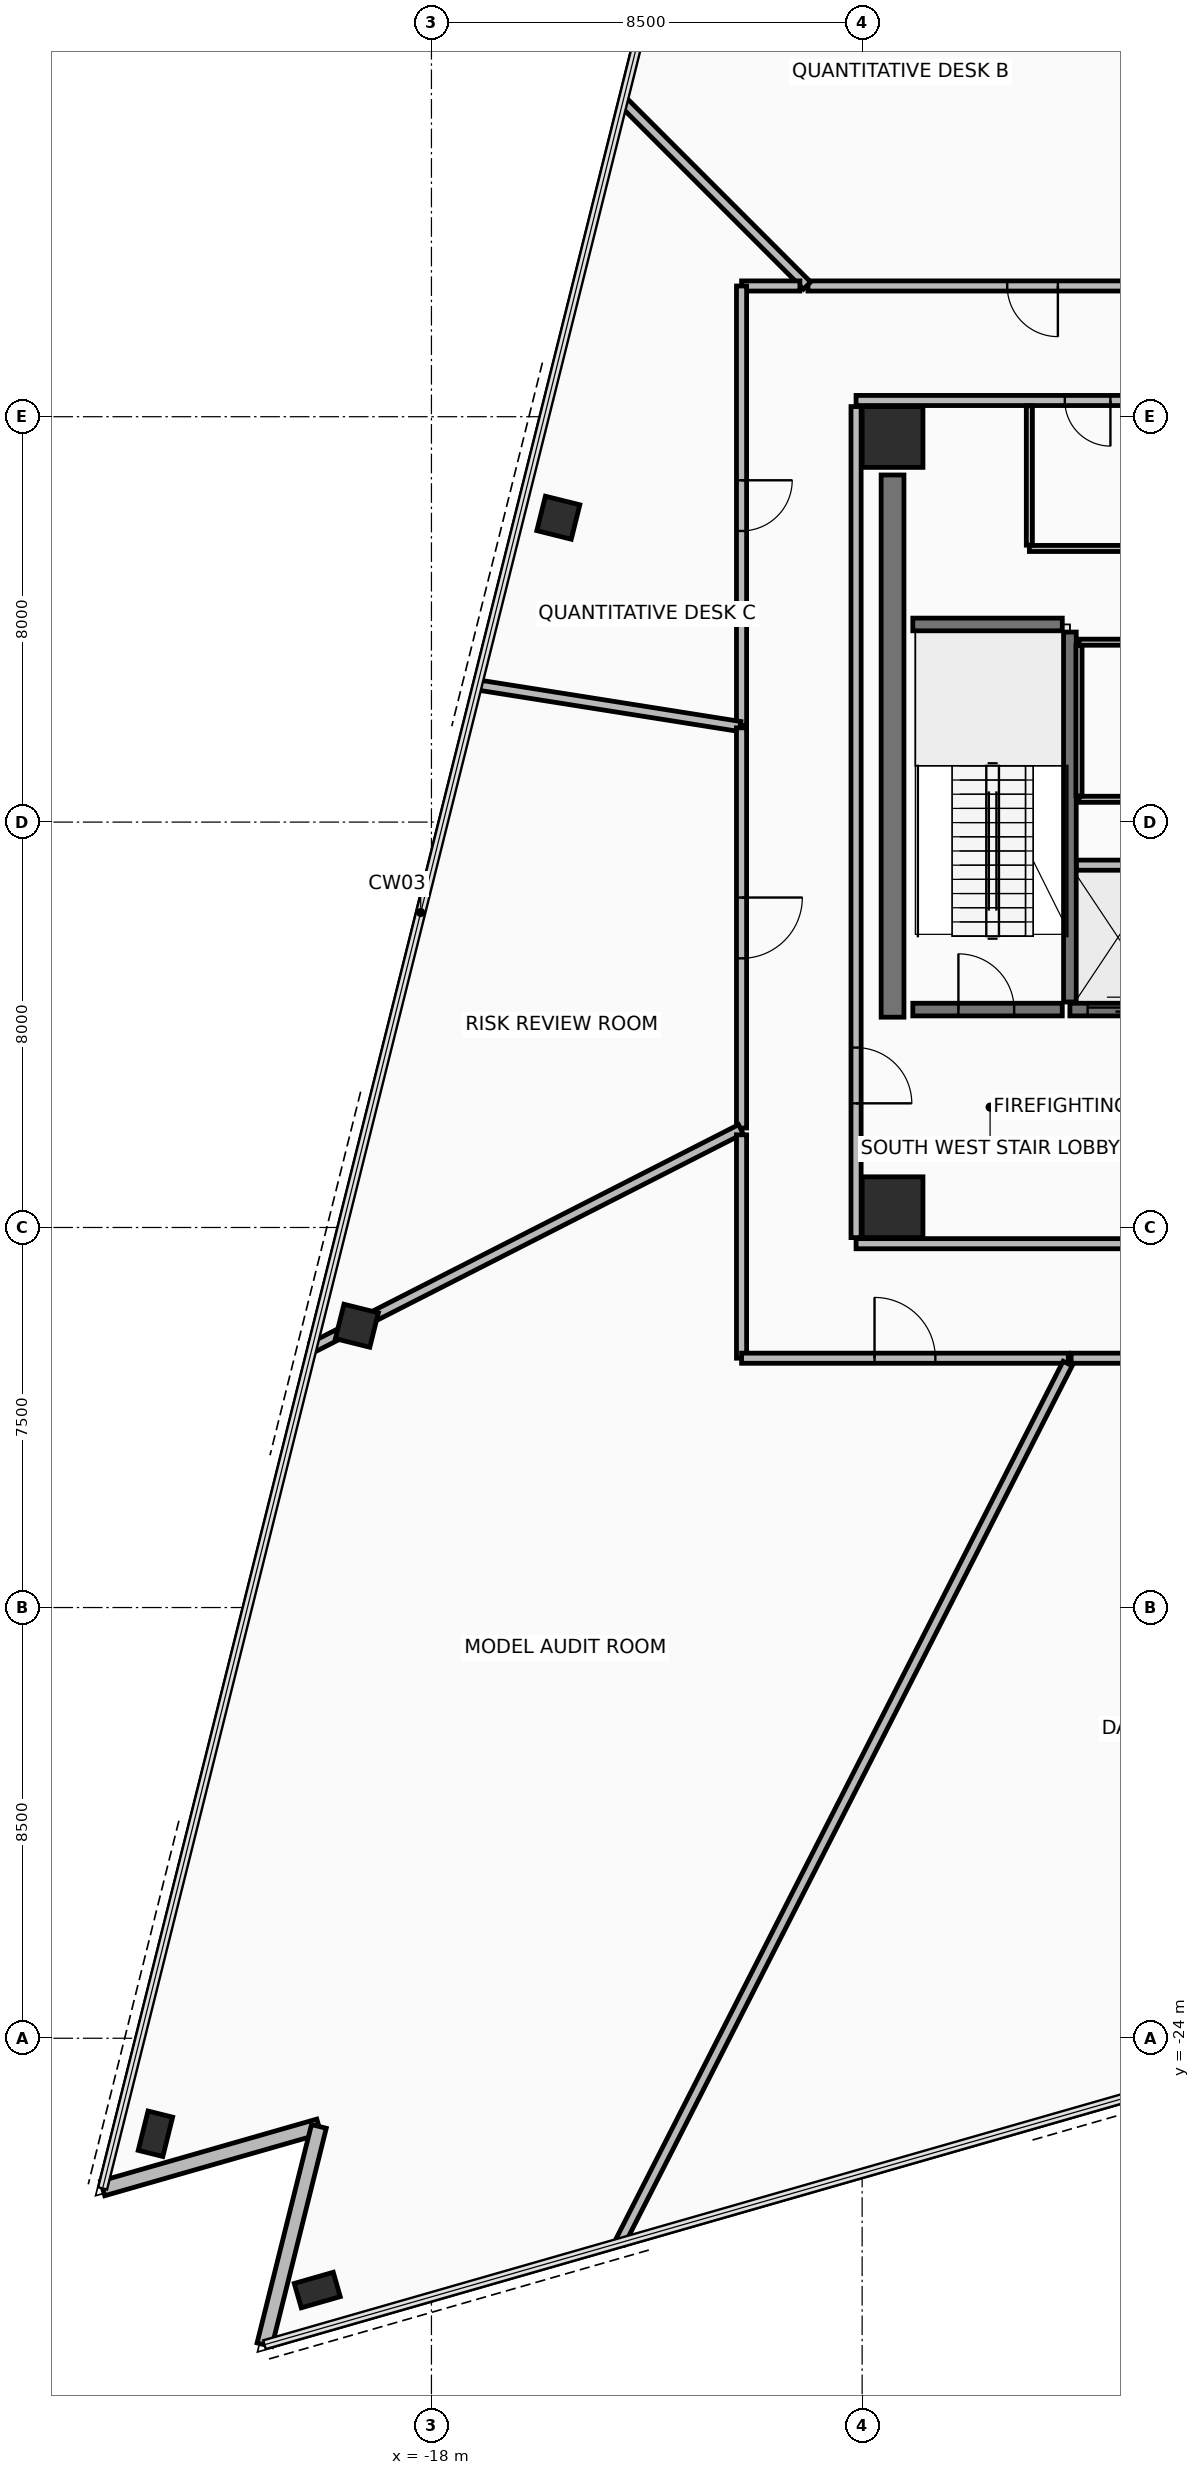
"""IFC4 building model, lengths in metres.
Left out: names, types, materials, properties, quantities, classifications, styles, units other than length and angle.
Written with IfcOpenShell. Run it as: python <this file> out.ifc"""

import sys

from ifc_helpers import new_model, si_unit, direction, frame, frame_2d, origin, origin_2d, place, context, subcontext, project, spatial, rectangle, hollow_rectangle, extrude, element, fill, save


model = new_model("IFC4")
c1 = context("Model", 3, precision=1e-05, world=origin(), true_north=direction((0.0, 1.0)))
c2 = subcontext(c1, "Body", "Model", "MODEL_VIEW")
j1 = project(units=[si_unit("LENGTHUNIT", "METRE"), si_unit("PLANEANGLEUNIT", "RADIAN")], contexts=[c1])
p1 = place(None, origin())
s1 = spatial("IfcSite", under=j1, at=p1, CompositionType="ELEMENT")
p2 = place(p1, origin())
s2 = spatial("IfcBuilding", under=s1, at=p2, CompositionType="ELEMENT")
p3 = place(p2, frame((0.0, 0.0, 107.7)))
s3 = spatial("IfcBuildingStorey", under=s2, at=p3, CompositionType="ELEMENT", Elevation=107.7)
for number, where, z_axis, x_axis in (
    (1, (-8.9, -7.6, 0.0), (0.0, 0.0, 1.0), (1.0, 0.0, 0.0)),
    (2, (-8.9, 7.6, 0.0), (0.0, 0.0, 1.0), (1.0, 0.0, 0.0)),
):
    element("IfcColumn", number, at=place(p3, frame(where, z_axis=z_axis, x_axis=x_axis)), inside=s3, PredefinedType="COLUMN", context=c2, shape_type="SweptSolid", body=[
        extrude(rectangle(XDim=1.2, YDim=1.2, at=origin_2d()), origin(), (0.0, 0.0, 1.0), 4.75),
    ])
for number, where, z_axis, x_axis in (
    (3, (-15.496, 6.007, 0.0), (0.0, 0.0, 1.0), (0.242, 0.97, 0.0)),
    (4, (-19.472, -9.939, 0.0), (0.0, 0.0, 1.0), (0.242, 0.97, 0.0)),
):
    element("IfcColumn", number, at=place(p3, frame(where, z_axis=z_axis, x_axis=x_axis)), inside=s3, PredefinedType="COLUMN", context=c2, shape_type="SweptSolid", body=[
        extrude(hollow_rectangle(XDim=0.7, YDim=0.7, WallThickness=0.04, at=origin_2d()), origin(), (0.0, 0.0, 1.0), 4.75),
    ])
for number, where, z_axis, x_axis in (
    (5, (-23.447, -25.885, 0.0), (0.0, 0.0, 1.0), (0.242, 0.97, 0.0)),
    (6, (-20.253, -28.969, 0.0), (0.0, 0.0, 1.0), (0.961, 0.276, 0.0)),
):
    element("IfcColumn", number, at=place(p3, frame(where, z_axis=z_axis, x_axis=x_axis)), inside=s3, PredefinedType="COLUMN", context=c2, shape_type="SweptSolid", body=[
        extrude(hollow_rectangle(XDim=0.5, YDim=0.8, WallThickness=0.04, at=origin_2d()), origin(), (0.0, 0.0, 1.0), 4.75),
    ])
p4 = place(p3, frame((-24.489, -26.964, 0.0), z_axis=(0.0, 0.0, 1.0), x_axis=(0.961259988927, 0.275643308803, 0.0)))
e7 = element("IfcWall", 7, at=p4, inside=s3, PredefinedType="STANDARD", context=c2, shape_type="SweptSolid", body=[
    extrude(rectangle(XDim=4.44, YDim=0.3, at=frame_2d((2.22, 0.0))), origin(), (0.0, 0.0, 1.0), 2.255),
])
p5 = place(p3, frame((-20.221, -25.74, 0.0), z_axis=(0.0, 0.0, 1.0), x_axis=(-0.241940431812, -0.970291104491, 0.0)))
e8 = element("IfcWall", 8, at=p5, inside=s3, PredefinedType="STANDARD", context=c2, shape_type="SweptSolid", body=[
    extrude(rectangle(XDim=4.44, YDim=0.3, at=frame_2d((2.22, 0.0))), origin(), (0.0, 0.0, 1.0), 2.255),
])
p6 = place(p3, frame((-8.9, -3.85, 0.0), z_axis=(0.0, 0.0, 1.0), x_axis=(0.0, 1.0, 0.0)))
e9 = element("IfcWall", 9, at=p6, inside=s3, PredefinedType="SHEAR", context=c2, shape_type="SweptSolid", body=[
    extrude(rectangle(XDim=10.7, YDim=0.45, at=frame_2d((5.35, 0.0))), origin(), (0.0, 0.0, 1.0), 4.56),
])
p7 = place(p3, frame((-9.62, -8.32, 0.0), z_axis=(0.0, 0.0, 1.0), x_axis=(1.0, 0.0, 0.0)))
e10 = element("IfcWall", 10, at=p7, inside=s3, PredefinedType="PARTITIONING", context=c2, shape_type="SweptSolid", body=[
    extrude(rectangle(XDim=19.24, YDim=0.2, at=frame_2d((9.62, 0.0))), origin(), (0.0, 0.0, 1.0), 2.355),
])
p8 = place(p7, frame((8.57, 0.0, 0.0)))
e11 = element("IfcOpeningElement", 11, at=p8, cuts=e10, PredefinedType="OPENING", context=c2, shape_type="SweptSolid", body=[
    extrude(rectangle(XDim=0.9, YDim=2.1, at=frame_2d((0.45, 1.05))), frame((0.0, 0.11, 0.0), z_axis=(0.0, -1.0, 0.0), x_axis=(1.0, 0.0, 0.0)), (0.0, 0.0, 1.0), 0.22),
])
p9 = place(p7, frame((15.02, 0.0, 0.0)))
e12 = element("IfcOpeningElement", 12, at=p9, cuts=e10, PredefinedType="OPENING", context=c2, shape_type="SweptSolid", body=[
    extrude(rectangle(XDim=0.9, YDim=2.1, at=frame_2d((0.45, 1.05))), frame((0.0, 0.11, 0.0), z_axis=(0.0, -1.0, 0.0), x_axis=(1.0, 0.0, 0.0)), (0.0, 0.0, 1.0), 0.22),
])
p10 = place(p3, frame((9.62, 8.32, 0.0), z_axis=(0.0, 0.0, 1.0), x_axis=(-1.0, 0.0, 0.0)))
e13 = element("IfcWall", 13, at=p10, inside=s3, PredefinedType="PARTITIONING", context=c2, shape_type="SweptSolid", body=[
    extrude(rectangle(XDim=19.24, YDim=0.2, at=frame_2d((9.62, 0.0))), origin(), (0.0, 0.0, 1.0), 2.355),
])
p11 = place(p10, frame((14.22, 0.0, 0.0)))
e14 = element("IfcOpeningElement", 14, at=p11, cuts=e13, PredefinedType="OPENING", context=c2, shape_type="SweptSolid", body=[
    extrude(rectangle(XDim=0.9, YDim=2.1, at=frame_2d((0.45, 1.05))), frame((0.0, 0.11, 0.0), z_axis=(0.0, -1.0, 0.0), x_axis=(1.0, 0.0, 0.0)), (0.0, 0.0, 1.0), 0.22),
])
p12 = place(p3, frame((-9.62, 8.2, 0.0), z_axis=(0.0, 0.0, 1.0), x_axis=(0.0, -1.0, 0.0)))
e15 = element("IfcWall", 15, at=p12, inside=s3, PredefinedType="PARTITIONING", context=c2, shape_type="SweptSolid", body=[
    extrude(rectangle(XDim=16.4, YDim=0.2, at=frame_2d((8.2, 0.0))), origin(), (0.0, 0.0, 1.0), 2.355),
])
p13 = place(p12, frame((12.65, 0.0, 0.0)))
e16 = element("IfcOpeningElement", 16, at=p13, cuts=e15, PredefinedType="OPENING", context=c2, shape_type="SweptSolid", body=[
    extrude(rectangle(XDim=1.1, YDim=2.15, at=frame_2d((0.55, 1.075))), frame((0.0, 0.11, 0.0), z_axis=(0.0, -1.0, 0.0), x_axis=(1.0, 0.0, 0.0)), (0.0, 0.0, 1.0), 0.22),
])
p14 = place(p3, frame((-5.4, -3.55, 0.0), z_axis=(0.0, 0.0, 1.0), x_axis=(0.0, 1.0, 0.0)))
e17 = element("IfcWall", 17, at=p14, inside=s3, PredefinedType="SHEAR", context=c2, shape_type="SweptSolid", body=[
    extrude(rectangle(XDim=7.3, YDim=0.25, at=frame_2d((3.65, 0.0))), origin(), (0.0, 0.0, 1.0), 4.56),
])
p15 = place(p3, frame((-8.5, -3.7, 0.0), z_axis=(0.0, 0.0, 1.0), x_axis=(1.0, 0.0, 0.0)))
e18 = element("IfcWall", 18, at=p15, inside=s3, PredefinedType="SHEAR", context=c2, shape_type="SweptSolid", body=[
    extrude(rectangle(XDim=2.95, YDim=0.25, at=frame_2d((1.475, 0.0))), origin(), (0.0, 0.0, 1.0), 4.56),
])
p16 = place(p15, frame((0.9, 0.0, 0.0)))
e19 = element("IfcOpeningElement", 19, at=p16, cuts=e18, PredefinedType="OPENING", context=c2, shape_type="SweptSolid", body=[
    extrude(rectangle(XDim=1.1, YDim=2.15, at=frame_2d((0.55, 1.075))), frame((0.0, 0.135, 0.0), z_axis=(0.0, -1.0, 0.0), x_axis=(1.0, 0.0, 0.0)), (0.0, 0.0, 1.0), 0.27),
])
p17 = place(p3, frame((-8.5, 3.9, 0.0), z_axis=(0.0, 0.0, 1.0), x_axis=(1.0, 0.0, 0.0)))
e20 = element("IfcWall", 20, at=p17, inside=s3, PredefinedType="SHEAR", context=c2, shape_type="SweptSolid", body=[
    extrude(rectangle(XDim=2.95, YDim=0.25, at=frame_2d((1.475, 0.0))), origin(), (0.0, 0.0, 1.0), 4.56),
])
p18 = place(p3, frame((-5.4, -3.7, 0.0), z_axis=(0.0, 0.0, 1.0), x_axis=(1.0, 0.0, 0.0)))
e21 = element("IfcWall", 21, at=p18, inside=s3, PredefinedType="SHEAR", context=c2, shape_type="SweptSolid", body=[
    extrude(rectangle(XDim=1.9, YDim=0.25, at=frame_2d((0.95, 0.0))), origin(), (0.0, 0.0, 1.0), 4.56),
])
p19 = place(p18, frame((0.35, 0.0, 0.0)))
e22 = element("IfcOpeningElement", 22, at=p19, cuts=e21, PredefinedType="OPENING", context=c2, shape_type="SweptSolid", body=[
    extrude(rectangle(XDim=1.2, YDim=2.2, at=frame_2d((0.6, 1.1))), frame((0.0, 0.135, 0.0), z_axis=(0.0, -1.0, 0.0), x_axis=(1.0, 0.0, 0.0)), (0.0, 0.0, 1.0), 0.27),
])
p20 = place(p3, frame((-5.27, -0.85, 0.0), z_axis=(0.0, 0.0, 1.0), x_axis=(1.0, 0.0, 0.0)))
e23 = element("IfcWall", 23, at=p20, inside=s3, PredefinedType="PARTITIONING", context=c2, shape_type="SweptSolid", body=[
    extrude(rectangle(XDim=1.77, YDim=0.2, at=frame_2d((0.885, 0.0))), origin(), (0.0, 0.0, 1.0), 4.56),
])
p21 = place(p3, frame((-5.22, 0.45, 0.0), z_axis=(0.0, 0.0, 1.0), x_axis=(1.0, 0.0, 0.0)))
e24 = element("IfcWall", 24, at=p21, inside=s3, PredefinedType="PARTITIONING", context=c2, shape_type="SweptSolid", body=[
    extrude(rectangle(XDim=3.17, YDim=0.12, at=frame_2d((1.585, 0.0))), origin(), (0.0, 0.0, 1.0), 4.56),
])
p22 = place(p3, frame((-2.115, 3.55, 0.0), z_axis=(0.0, 0.0, 1.0), x_axis=(-1.0, 0.0, 0.0)))
e25 = element("IfcWall", 25, at=p22, inside=s3, PredefinedType="PARTITIONING", context=c2, shape_type="SweptSolid", body=[
    extrude(rectangle(XDim=3.105, YDim=0.12, at=frame_2d((1.552, 0.0))), origin(), (0.0, 0.0, 1.0), 4.56),
])
p23 = place(p3, frame((-5.22, 3.485, 0.0), z_axis=(0.0, 0.0, 1.0), x_axis=(0.0, -1.0, 0.0)))
e26 = element("IfcWall", 26, at=p23, inside=s3, PredefinedType="PARTITIONING", context=c2, shape_type="SweptSolid", body=[
    extrude(rectangle(XDim=2.97, YDim=0.12, at=frame_2d((1.485, 0.0))), origin(), (0.0, 0.0, 1.0), 4.56),
])
p24 = place(p3, frame((-6.2, 5.4, 0.0), z_axis=(0.0, 0.0, 1.0), x_axis=(1.0, 0.0, 0.0)))
e27 = element("IfcWall", 27, at=p24, inside=s3, PredefinedType="PARTITIONING", context=c2, shape_type="SweptSolid", body=[
    extrude(rectangle(XDim=2.3, YDim=0.12, at=frame_2d((1.15, 0.0))), origin(), (0.0, 0.0, 1.0), 4.56),
])
p25 = place(p3, frame((-6.2, 8.215, 0.0), z_axis=(0.0, 0.0, 1.0), x_axis=(0.0, -1.0, 0.0)))
e28 = element("IfcWall", 28, at=p25, inside=s3, PredefinedType="PARTITIONING", context=c2, shape_type="SweptSolid", body=[
    extrude(rectangle(XDim=2.75, YDim=0.12, at=frame_2d((1.375, 0.0))), origin(), (0.0, 0.0, 1.0), 3.755),
])
p26 = place(p3, frame((-1.705, 10.58, 0.0), z_axis=(0.0, 0.0, 1.0), x_axis=(-1.0, 0.0, 0.0)))
e29 = element("IfcWall", 29, at=p26, inside=s3, PredefinedType="PARTITIONING", context=c2, shape_type="SweptSolid", body=[
    extrude(rectangle(XDim=8.865, YDim=0.2, at=frame_2d((4.432, 0.0))), origin(), (0.0, 0.0, 1.0), 2.355),
])
p27 = place(p26, frame((3.932, 0.0, 0.0)))
e30 = element("IfcOpeningElement", 30, at=p27, cuts=e29, PredefinedType="OPENING", context=c2, shape_type="SweptSolid", body=[
    extrude(rectangle(XDim=1.0, YDim=2.15, at=frame_2d((0.5, 1.075))), frame((0.0, 0.11, 0.0), z_axis=(0.0, -1.0, 0.0), x_axis=(1.0, 0.0, 0.0)), (0.0, 0.0, 1.0), 0.22),
])
p28 = place(p3, frame((-10.587, 10.587, 0.0), z_axis=(0.0, 0.0, 1.0), x_axis=(-0.707106781187, 0.707106781187, 0.0)))
e31 = element("IfcWall", 31, at=p28, inside=s3, PredefinedType="PARTITIONING", context=c2, shape_type="SweptSolid", body=[
    extrude(rectangle(XDim=5.125, YDim=0.2, at=frame_2d((2.562, 0.0))), origin(), (0.0, 0.0, 1.0), 2.255),
])
p29 = place(p3, frame((-10.729, 10.58, 0.0), z_axis=(0.0, 0.0, 1.0), x_axis=(-1.0, 0.0, 0.0)))
e32 = element("IfcWall", 32, at=p29, inside=s3, PredefinedType="PARTITIONING", context=c2, shape_type="SweptSolid", body=[
    extrude(rectangle(XDim=1.151, YDim=0.2, at=frame_2d((0.575, 0.0))), origin(), (0.0, 0.0, 1.0), 4.195),
])
p30 = place(p3, frame((-11.88, 10.579, 0.0), z_axis=(0.0, 0.0, 1.0), x_axis=(0.0, -1.0, 0.0)))
e33 = element("IfcWall", 33, at=p30, inside=s3, PredefinedType="PARTITIONING", context=c2, shape_type="SweptSolid", body=[
    extrude(rectangle(XDim=8.668, YDim=0.2, at=frame_2d((4.334, 0.0))), origin(), (0.0, 0.0, 1.0), 2.755),
])
p31 = place(p30, frame((3.834, 0.0, 0.0)))
e34 = element("IfcOpeningElement", 34, at=p31, cuts=e33, PredefinedType="OPENING", context=c2, shape_type="SweptSolid", body=[
    extrude(rectangle(XDim=1.0, YDim=2.15, at=frame_2d((0.5, 1.075))), frame((0.0, 0.11, 0.0), z_axis=(0.0, -1.0, 0.0), x_axis=(1.0, 0.0, 0.0)), (0.0, 0.0, 1.0), 0.22),
])
p32 = place(p3, frame((-11.909, 1.886, 0.0), z_axis=(0.0, 0.0, 1.0), x_axis=(-0.987686625079, 0.156445295998, 0.0)))
e35 = element("IfcWall", 35, at=p32, inside=s3, PredefinedType="PARTITIONING", context=c2, shape_type="SweptSolid", body=[
    extrude(rectangle(XDim=5.22, YDim=0.2, at=frame_2d((2.61, 0.0))), origin(), (0.0, 0.0, 1.0), 2.255),
])
p33 = place(p3, frame((-11.88, 1.86, 0.0), z_axis=(0.0, 0.0, 1.0), x_axis=(0.0, -1.0, 0.0)))
e36 = element("IfcWall", 36, at=p33, inside=s3, PredefinedType="PARTITIONING", context=c2, shape_type="SweptSolid", body=[
    extrude(rectangle(XDim=7.898, YDim=0.2, at=frame_2d((3.949, 0.0))), origin(), (0.0, 0.0, 1.0), 4.56),
])
p34 = place(p33, frame((3.349, 0.0, 0.0)))
e37 = element("IfcOpeningElement", 37, at=p34, cuts=e36, PredefinedType="OPENING", context=c2, shape_type="SweptSolid", body=[
    extrude(rectangle(XDim=1.2, YDim=2.15, at=frame_2d((0.6, 1.075))), frame((0.0, 0.11, 0.0), z_axis=(0.0, -1.0, 0.0), x_axis=(1.0, 0.0, 0.0)), (0.0, 0.0, 1.0), 0.22),
])
p35 = place(p3, frame((-11.894, -6.06, 0.0), z_axis=(0.0, 0.0, 1.0), x_axis=(-0.891001418235, -0.454000520598, 0.0)))
e38 = element("IfcWall", 38, at=p35, inside=s3, PredefinedType="PARTITIONING", context=c2, shape_type="SweptSolid", body=[
    extrude(rectangle(XDim=9.493, YDim=0.2, at=frame_2d((4.747, 0.0))), origin(), (0.0, 0.0, 1.0), 2.255),
])
p36 = place(p3, frame((-11.88, -6.171, 0.0), z_axis=(0.0, 0.0, 1.0), x_axis=(0.0, -1.0, 0.0)))
e39 = element("IfcWall", 39, at=p36, inside=s3, PredefinedType="PARTITIONING", context=c2, shape_type="SweptSolid", body=[
    extrude(rectangle(XDim=4.408, YDim=0.2, at=frame_2d((2.204, 0.0))), origin(), (0.0, 0.0, 1.0), 2.755),
])
p37 = place(p3, frame((-11.879, -10.58, 0.0), z_axis=(0.0, 0.0, 1.0), x_axis=(1.0, 0.0, 0.0)))
e40 = element("IfcWall", 40, at=p37, inside=s3, PredefinedType="PARTITIONING", context=c2, shape_type="SweptSolid", body=[
    extrude(rectangle(XDim=6.448, YDim=0.2, at=frame_2d((3.224, 0.0))), origin(), (0.0, 0.0, 1.0), 2.355),
])
p38 = place(p37, frame((2.624, 0.0, 0.0)))
e41 = element("IfcOpeningElement", 41, at=p38, cuts=e40, PredefinedType="OPENING", context=c2, shape_type="SweptSolid", body=[
    extrude(rectangle(XDim=1.2, YDim=2.15, at=frame_2d((0.6, 1.075))), frame((0.0, 0.11, 0.0), z_axis=(0.0, -1.0, 0.0), x_axis=(1.0, 0.0, 0.0)), (0.0, 0.0, 1.0), 0.22),
])
p39 = place(p3, frame((-5.444, -10.685, 0.0), z_axis=(0.0, 0.0, 1.0), x_axis=(-0.453983839292, -0.891009917824, 0.0)))
e42 = element("IfcWall", 42, at=p39, inside=s3, PredefinedType="PARTITIONING", context=c2, shape_type="SweptSolid", body=[
    extrude(rectangle(XDim=19.465, YDim=0.2, at=frame_2d((9.732, 0.0))), origin(), (0.0, 0.0, 1.0), 2.255),
])
p40 = place(p3, frame((-5.375, -10.58, 0.0), z_axis=(0.0, 0.0, 1.0), x_axis=(1.0, 0.0, 0.0)))
e43 = element("IfcWall", 43, at=p40, inside=s3, PredefinedType="PARTITIONING", context=c2, shape_type="SweptSolid", body=[
    extrude(rectangle(XDim=7.03, YDim=0.2, at=frame_2d((3.515, 0.0))), origin(), (0.0, 0.0, 1.0), 2.355),
])
p41 = place(p40, frame((3.065, 0.0, 0.0)))
e44 = element("IfcOpeningElement", 44, at=p41, cuts=e43, PredefinedType="OPENING", context=c2, shape_type="SweptSolid", body=[
    extrude(rectangle(XDim=0.9, YDim=2.1, at=frame_2d((0.45, 1.05))), frame((0.0, 0.11, 0.0), z_axis=(0.0, -1.0, 0.0), x_axis=(1.0, 0.0, 0.0)), (0.0, 0.0, 1.0), 0.22),
])
p42 = place(p13, frame((1.1, 0.0, 0.0), z_axis=(0.0, 0.0, 1.0), x_axis=(-1.0, 0.0, 0.0)))
e45 = element("IfcDoor", 45, at=p42, inside=s3, OperationType="SINGLE_SWING_LEFT", PredefinedType="DOOR", context=c2, shape_type="SweptSolid", body=[
    extrude(rectangle(XDim=1.1, YDim=2.15, at=frame_2d((0.55, 1.075))), frame((0.0, 0.025, 0.0), z_axis=(0.0, -1.0, 0.0), x_axis=(1.0, 0.0, 0.0)), (0.0, 0.0, 1.0), 0.05),
])
fill(e16, e45)
p43 = place(p16, origin())
e46 = element("IfcDoor", 46, at=p43, inside=s3, OperationType="SINGLE_SWING_LEFT", PredefinedType="DOOR", context=c2, shape_type="SweptSolid", body=[
    extrude(rectangle(XDim=1.1, YDim=2.15, at=frame_2d((0.55, 1.075))), frame((0.0, 0.025, 0.0), z_axis=(0.0, -1.0, 0.0), x_axis=(1.0, 0.0, 0.0)), (0.0, 0.0, 1.0), 0.05),
])
fill(e19, e46)
p44 = place(p19, origin())
e47 = element("IfcDoor", 47, at=p44, inside=s3, OperationType="SLIDING_TO_RIGHT", PredefinedType="DOOR", context=c2, shape_type="SweptSolid", body=[
    extrude(rectangle(XDim=1.2, YDim=2.2, at=frame_2d((0.6, 1.1))), frame((0.0, 0.025, 0.0), z_axis=(0.0, -1.0, 0.0), x_axis=(1.0, 0.0, 0.0)), (0.0, 0.0, 1.0), 0.05),
])
fill(e22, e47)
p45 = place(p11, origin())
e48 = element("IfcDoor", 48, at=p45, inside=s3, OperationType="SINGLE_SWING_LEFT", PredefinedType="DOOR", context=c2, shape_type="SweptSolid", body=[
    extrude(rectangle(XDim=0.9, YDim=2.1, at=frame_2d((0.45, 1.05))), frame((0.0, 0.025, 0.0), z_axis=(0.0, -1.0, 0.0), x_axis=(1.0, 0.0, 0.0)), (0.0, 0.0, 1.0), 0.05),
])
fill(e14, e48)
p46 = place(p27, origin())
e49 = element("IfcDoor", 49, at=p46, inside=s3, OperationType="SINGLE_SWING_RIGHT", PredefinedType="DOOR", context=c2, shape_type="SweptSolid", body=[
    extrude(rectangle(XDim=1.0, YDim=2.15, at=frame_2d((0.5, 1.075))), frame((0.0, 0.025, 0.0), z_axis=(0.0, -1.0, 0.0), x_axis=(1.0, 0.0, 0.0)), (0.0, 0.0, 1.0), 0.05),
])
fill(e30, e49)
p47 = place(p31, origin())
e50 = element("IfcDoor", 50, at=p47, inside=s3, OperationType="SINGLE_SWING_RIGHT", PredefinedType="DOOR", context=c2, shape_type="SweptSolid", body=[
    extrude(rectangle(XDim=1.0, YDim=2.15, at=frame_2d((0.5, 1.075))), frame((0.0, 0.025, 0.0), z_axis=(0.0, -1.0, 0.0), x_axis=(1.0, 0.0, 0.0)), (0.0, 0.0, 1.0), 0.05),
])
fill(e34, e50)
p48 = place(p34, origin())
e51 = element("IfcDoor", 51, at=p48, inside=s3, OperationType="SINGLE_SWING_LEFT", PredefinedType="DOOR", context=c2, shape_type="SweptSolid", body=[
    extrude(rectangle(XDim=1.2, YDim=2.15, at=frame_2d((0.6, 1.075))), frame((0.0, 0.025, 0.0), z_axis=(0.0, -1.0, 0.0), x_axis=(1.0, 0.0, 0.0)), (0.0, 0.0, 1.0), 0.05),
])
fill(e37, e51)
p49 = place(p38, origin())
e52 = element("IfcDoor", 52, at=p49, inside=s3, OperationType="SINGLE_SWING_LEFT", PredefinedType="DOOR", context=c2, shape_type="SweptSolid", body=[
    extrude(rectangle(XDim=1.2, YDim=2.15, at=frame_2d((0.6, 1.075))), frame((0.0, 0.025, 0.0), z_axis=(0.0, -1.0, 0.0), x_axis=(1.0, 0.0, 0.0)), (0.0, 0.0, 1.0), 0.05),
])
fill(e41, e52)
save(model, sys.argv[1])
